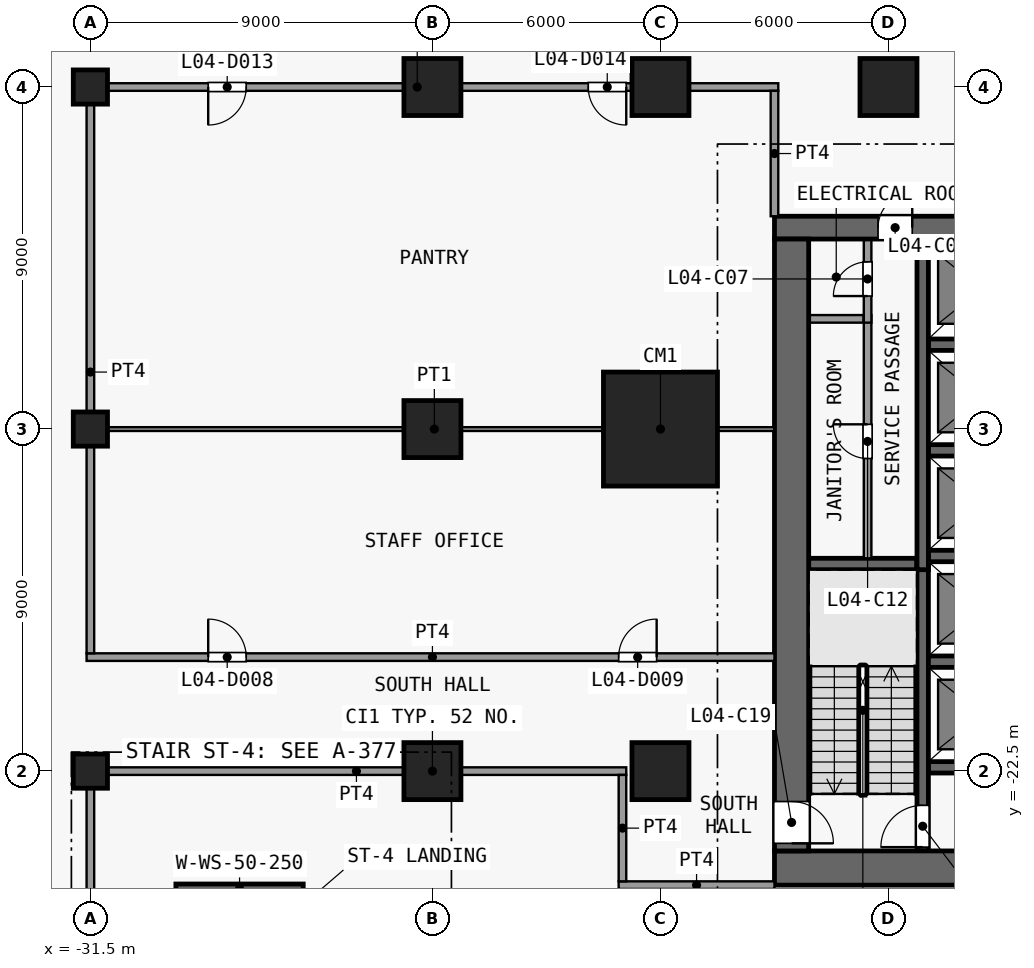
"""IFC4 building model, lengths in metres.
Left out: names, types, materials, properties, quantities, classifications, styles, units other than length and angle.
Written with IfcOpenShell. Run it as: python <this file> out.ifc"""

import sys

from ifc_helpers import new_model, si_unit, direction, frame, frame_2d, origin, origin_2d, place, context, subcontext, project, spatial, rectangle, extrude, element, fill, save


model = new_model("IFC4")
c1 = context("Model", 3, precision=1e-05, world=origin(), true_north=direction((0.0, 1.0)))
c2 = subcontext(c1, "Body", "Model", "MODEL_VIEW")
j1 = project(units=[si_unit("LENGTHUNIT", "METRE"), si_unit("PLANEANGLEUNIT", "RADIAN")], contexts=[c1])
p1 = place(None, origin())
s1 = spatial("IfcSite", under=j1, at=p1, CompositionType="ELEMENT")
p2 = place(p1, origin())
s2 = spatial("IfcBuilding", under=s1, at=p2, CompositionType="ELEMENT")
p3 = place(p2, frame((0.0, 0.0, 23.5)))
s3 = spatial("IfcBuildingStorey", under=s2, at=p3, CompositionType="ELEMENT", Elevation=23.5)
for number, where, z_axis, x_axis in (
    (1, (-31.5, -22.5, 0.0), (0.0, 0.0, 1.0), (1.0, 0.0, 0.0)),
    (2, (-31.5, -13.5, 0.0), (0.0, 0.0, 1.0), (1.0, 0.0, 0.0)),
    (3, (-31.5, -4.5, 0.0), (0.0, 0.0, 1.0), (1.0, 0.0, 0.0)),
):
    element("IfcColumn", number, at=place(p3, frame(where, z_axis=z_axis, x_axis=x_axis)), inside=s3, PredefinedType="COLUMN", context=c2, shape_type="SweptSolid", body=[
        extrude(rectangle(XDim=0.9, YDim=0.9, at=origin_2d()), origin(), (0.0, 0.0, 1.0), 4.5),
    ])
for number, where, z_axis, x_axis in (
    (4, (-22.5, -22.5, 0.0), (0.0, 0.0, 1.0), (1.0, 0.0, 0.0)),
    (5, (-22.5, -13.5, 0.0), (0.0, 0.0, 1.0), (1.0, 0.0, 0.0)),
    (6, (-22.5, -4.5, 0.0), (0.0, 0.0, 1.0), (1.0, 0.0, 0.0)),
    (7, (-16.5, -22.5, 0.0), (0.0, 0.0, 1.0), (1.0, 0.0, 0.0)),
):
    element("IfcColumn", number, at=place(p3, frame(where, z_axis=z_axis, x_axis=x_axis)), inside=s3, PredefinedType="COLUMN", context=c2, shape_type="SweptSolid", body=[
        extrude(rectangle(XDim=1.5, YDim=1.5, at=origin_2d()), origin(), (0.0, 0.0, 1.0), 4.5),
    ])
p4 = place(p3, frame((-16.5, -13.5, 0.0), z_axis=(0.0, 0.0, 1.0), x_axis=(1.0, 0.0, 0.0)))
e8 = element("IfcColumn", 8, at=p4, inside=s3, PredefinedType="COLUMN", context=c2, shape_type="SweptSolid", body=[
    extrude(rectangle(XDim=3.0, YDim=3.0, at=origin_2d()), origin(), (0.0, 0.0, 1.0), 4.5),
])
for number, where, z_axis, x_axis in (
    (9, (-16.5, -4.5, 0.0), (0.0, 0.0, 1.0), (1.0, 0.0, 0.0)),
    (10, (-10.5, -4.5, 0.0), (0.0, 0.0, 1.0), (1.0, 0.0, 0.0)),
):
    element("IfcColumn", number, at=place(p3, frame(where, z_axis=z_axis, x_axis=x_axis)), inside=s3, PredefinedType="COLUMN", context=c2, shape_type="SweptSolid", body=[
        extrude(rectangle(XDim=1.5, YDim=1.5, at=origin_2d()), origin(), (0.0, 0.0, 1.0), 4.5),
    ])
p5 = place(p3, frame((-13.5, -25.05, 0.0), z_axis=(0.0, 0.0, 1.0), x_axis=(1.0, 0.0, 0.0)))
e11 = element("IfcWall", 11, at=p5, inside=s3, PredefinedType="SHEAR", context=c2, shape_type="SweptSolid", body=[
    extrude(rectangle(XDim=27.0, YDim=0.9, at=frame_2d((13.5, 0.0))), origin(), (0.0, 0.0, 1.0), 4.15),
])
p6 = place(p3, frame((-13.5, -8.2, 0.0), z_axis=(0.0, 0.0, 1.0), x_axis=(1.0, 0.0, 0.0)))
e12 = element("IfcWall", 12, at=p6, inside=s3, PredefinedType="SHEAR", context=c2, shape_type="SweptSolid", body=[
    extrude(rectangle(XDim=27.0, YDim=0.6, at=frame_2d((13.5, 0.0))), origin(), (0.0, 0.0, 1.0), 4.15),
])
p7 = place(p6, frame((7.8, 0.0, 0.0)))
e13 = element("IfcOpeningElement", 13, at=p7, cuts=e12, PredefinedType="OPENING", context=c2, shape_type="SweptSolid", body=[
    extrude(rectangle(XDim=1.8, YDim=2.1, at=frame_2d((0.9, 1.05))), frame((0.0, 0.31, 0.0), z_axis=(0.0, -1.0, 0.0), x_axis=(1.0, 0.0, 0.0)), (0.0, 0.0, 1.0), 0.62),
])
p8 = place(p6, frame((17.4, 0.0, 0.0)))
e14 = element("IfcOpeningElement", 14, at=p8, cuts=e12, PredefinedType="OPENING", context=c2, shape_type="SweptSolid", body=[
    extrude(rectangle(XDim=1.8, YDim=2.1, at=frame_2d((0.9, 1.05))), frame((0.0, 0.31, 0.0), z_axis=(0.0, -1.0, 0.0), x_axis=(1.0, 0.0, 0.0)), (0.0, 0.0, 1.0), 0.62),
])
p9 = place(p6, frame((2.725, 0.0, 0.0)))
e15 = element("IfcOpeningElement", 15, at=p9, cuts=e12, PredefinedType="OPENING", context=c2, shape_type="SweptSolid", body=[
    extrude(rectangle(XDim=0.9, YDim=2.1, at=frame_2d((0.45, 1.05))), frame((0.0, 0.31, 0.0), z_axis=(0.0, -1.0, 0.0), x_axis=(1.0, 0.0, 0.0)), (0.0, 0.0, 1.0), 0.62),
])
p10 = place(p6, frame((23.375, 0.0, 0.0)))
e16 = element("IfcOpeningElement", 16, at=p10, cuts=e12, PredefinedType="OPENING", context=c2, shape_type="SweptSolid", body=[
    extrude(rectangle(XDim=0.9, YDim=2.1, at=frame_2d((0.45, 1.05))), frame((0.0, 0.31, 0.0), z_axis=(0.0, -1.0, 0.0), x_axis=(1.0, 0.0, 0.0)), (0.0, 0.0, 1.0), 0.62),
])
p11 = place(p3, frame((-13.05, -8.5, 0.0), z_axis=(0.0, 0.0, 1.0), x_axis=(0.0, -1.0, 0.0)))
e17 = element("IfcWall", 17, at=p11, inside=s3, PredefinedType="SHEAR", context=c2, shape_type="SweptSolid", body=[
    extrude(rectangle(XDim=16.1, YDim=0.9, at=frame_2d((8.05, 0.0))), origin(), (0.0, 0.0, 1.0), 4.15),
])
p12 = place(p11, frame((14.8, 0.0, 0.0)))
e18 = element("IfcOpeningElement", 18, at=p12, cuts=e17, PredefinedType="OPENING", context=c2, shape_type="SweptSolid", body=[
    extrude(rectangle(XDim=1.1, YDim=2.1, at=frame_2d((0.55, 1.05))), frame((0.0, 0.46, 0.0), z_axis=(0.0, -1.0, 0.0), x_axis=(1.0, 0.0, 0.0)), (0.0, 0.0, 1.0), 0.92),
])
for number, where, z_axis, x_axis in (
    (19, (-9.45, -22.4, 0.0), (0.0, 0.0, 1.0), (1.0, 0.0, 0.0)),
    (20, (-9.45, -19.62, 0.0), (0.0, 0.0, 1.0), (1.0, 0.0, 0.0)),
):
    element("IfcWall", number, at=place(p3, frame(where, z_axis=z_axis, x_axis=x_axis)), inside=s3, PredefinedType="SHEAR", context=c2, shape_type="SweptSolid", body=[
        extrude(rectangle(XDim=2.8, YDim=0.3, at=frame_2d((1.4, 0.0))), origin(), (0.0, 0.0, 1.0), 4.15),
    ])
p13 = place(p3, frame((-12.6, -17.05, 0.0), z_axis=(0.0, 0.0, 1.0), x_axis=(1.0, 0.0, 0.0)))
e21 = element("IfcWall", 21, at=p13, inside=s3, PredefinedType="SHEAR", context=c2, shape_type="SweptSolid", body=[
    extrude(rectangle(XDim=2.85, YDim=0.3, at=frame_2d((1.425, 0.0))), origin(), (0.0, 0.0, 1.0), 4.15),
])
for number, where, z_axis, x_axis in (
    (22, (-9.45, -16.84, 0.0), (0.0, 0.0, 1.0), (1.0, 0.0, 0.0)),
    (23, (-9.45, -14.06, 0.0), (0.0, 0.0, 1.0), (1.0, 0.0, 0.0)),
    (24, (-9.45, -11.28, 0.0), (0.0, 0.0, 1.0), (1.0, 0.0, 0.0)),
):
    element("IfcWall", number, at=place(p3, frame(where, z_axis=z_axis, x_axis=x_axis)), inside=s3, PredefinedType="SHEAR", context=c2, shape_type="SweptSolid", body=[
        extrude(rectangle(XDim=2.8, YDim=0.3, at=frame_2d((1.4, 0.0))), origin(), (0.0, 0.0, 1.0), 4.15),
    ])
p14 = place(p3, frame((-12.6, -10.6, 0.0), z_axis=(0.0, 0.0, 1.0), x_axis=(1.0, 0.0, 0.0)))
e25 = element("IfcWall", 25, at=p14, inside=s3, PredefinedType="PARTITIONING", context=c2, shape_type="SweptSolid", body=[
    extrude(rectangle(XDim=1.45, YDim=0.2, at=frame_2d((0.725, 0.0))), origin(), (0.0, 0.0, 1.0), 4.15),
])
p15 = place(p3, frame((-11.05, -16.9, 0.0), z_axis=(0.0, 0.0, 1.0), x_axis=(0.0, 1.0, 0.0)))
e26 = element("IfcWall", 26, at=p15, inside=s3, PredefinedType="PARTITIONING", context=c2, shape_type="SweptSolid", body=[
    extrude(rectangle(XDim=6.4, YDim=0.2, at=frame_2d((3.2, 0.0))), origin(), (0.0, 0.0, 1.0), 4.15),
])
p16 = place(p15, frame((2.625, 0.0, 0.0)))
e27 = element("IfcOpeningElement", 27, at=p16, cuts=e26, PredefinedType="OPENING", context=c2, shape_type="SweptSolid", body=[
    extrude(rectangle(XDim=0.9, YDim=2.1, at=frame_2d((0.45, 1.05))), frame((0.0, 0.11, 0.0), z_axis=(0.0, -1.0, 0.0), x_axis=(1.0, 0.0, 0.0)), (0.0, 0.0, 1.0), 0.22),
])
p17 = place(p3, frame((-11.05, -10.7, 0.0), z_axis=(0.0, 0.0, 1.0), x_axis=(0.0, 1.0, 0.0)))
e28 = element("IfcWall", 28, at=p17, inside=s3, PredefinedType="PARTITIONING", context=c2, shape_type="SweptSolid", body=[
    extrude(rectangle(XDim=2.2, YDim=0.2, at=frame_2d((1.1, 0.0))), origin(), (0.0, 0.0, 1.0), 4.15),
])
p18 = place(p17, frame((0.7, 0.0, 0.0)))
e29 = element("IfcOpeningElement", 29, at=p18, cuts=e28, PredefinedType="OPENING", context=c2, shape_type="SweptSolid", body=[
    extrude(rectangle(XDim=0.9, YDim=2.1, at=frame_2d((0.45, 1.05))), frame((0.0, 0.11, 0.0), z_axis=(0.0, -1.0, 0.0), x_axis=(1.0, 0.0, 0.0)), (0.0, 0.0, 1.0), 0.22),
])
p19 = place(p3, frame((-9.6, -24.6, 0.0), z_axis=(0.0, 0.0, 1.0), x_axis=(0.0, 1.0, 0.0)))
e30 = element("IfcWall", 30, at=p19, inside=s3, PredefinedType="SHEAR", context=c2, shape_type="SweptSolid", body=[
    extrude(rectangle(XDim=7.7, YDim=0.3, at=frame_2d((3.85, 0.0))), origin(), (0.0, 0.0, 1.0), 4.15),
])
p20 = place(p19, frame((0.1, 0.0, 0.0)))
e31 = element("IfcOpeningElement", 31, at=p20, cuts=e30, PredefinedType="OPENING", context=c2, shape_type="SweptSolid", body=[
    extrude(rectangle(XDim=1.1, YDim=2.1, at=frame_2d((0.55, 1.05))), frame((0.0, 0.16, 0.0), z_axis=(0.0, -1.0, 0.0), x_axis=(1.0, 0.0, 0.0)), (0.0, 0.0, 1.0), 0.32),
])
p21 = place(p3, frame((-9.6, -17.2, 0.0), z_axis=(0.0, 0.0, 1.0), x_axis=(0.0, 1.0, 0.0)))
e32 = element("IfcWall", 32, at=p21, inside=s3, PredefinedType="SHEAR", context=c2, shape_type="SweptSolid", body=[
    extrude(rectangle(XDim=8.7, YDim=0.3, at=frame_2d((4.35, 0.0))), origin(), (0.0, 0.0, 1.0), 4.15),
])
p22 = place(p3, frame((-29.25, -25.595, 0.0), z_axis=(0.0, 0.0, 1.0), x_axis=(1.0, 0.0, 0.0)))
e33 = element("IfcWall", 33, at=p22, inside=s3, PredefinedType="SHEAR", context=c2, shape_type="SweptSolid", body=[
    extrude(rectangle(XDim=3.35, YDim=0.25, at=frame_2d((1.675, 0.0))), origin(), (0.0, 0.0, 1.0), 4.15),
])
p23 = place(p3, frame((-17.6, -25.5, 0.0), z_axis=(0.0, 0.0, 1.0), x_axis=(1.0, 0.0, 0.0)))
e34 = element("IfcWall", 34, at=p23, inside=s3, PredefinedType="PARTITIONING", context=c2, shape_type="SweptSolid", body=[
    extrude(rectangle(XDim=4.1, YDim=0.2, at=frame_2d((2.05, 0.0))), origin(), (0.0, 0.0, 1.0), 4.15),
])
p24 = place(p3, frame((-31.6, -22.5, 0.0), z_axis=(0.0, 0.0, 1.0), x_axis=(1.0, 0.0, 0.0)))
e35 = element("IfcWall", 35, at=p24, inside=s3, PredefinedType="PARTITIONING", context=c2, shape_type="SweptSolid", body=[
    extrude(rectangle(XDim=14.2, YDim=0.2, at=frame_2d((7.1, 0.0))), origin(), (0.0, 0.0, 1.0), 4.15),
])
p25 = place(p3, frame((-31.6, -19.5, 0.0), z_axis=(0.0, 0.0, 1.0), x_axis=(1.0, 0.0, 0.0)))
e36 = element("IfcWall", 36, at=p25, inside=s3, PredefinedType="PARTITIONING", context=c2, shape_type="SweptSolid", body=[
    extrude(rectangle(XDim=18.1, YDim=0.2, at=frame_2d((9.05, 0.0))), origin(), (0.0, 0.0, 1.0), 4.15),
])
p26 = place(p25, frame((3.2, 0.0, 0.0)))
e37 = element("IfcOpeningElement", 37, at=p26, cuts=e36, PredefinedType="OPENING", context=c2, shape_type="SweptSolid", body=[
    extrude(rectangle(XDim=1.0, YDim=2.1, at=frame_2d((0.5, 1.05))), frame((0.0, 0.11, 0.0), z_axis=(0.0, -1.0, 0.0), x_axis=(1.0, 0.0, 0.0)), (0.0, 0.0, 1.0), 0.22),
])
p27 = place(p25, frame((14.0, 0.0, 0.0)))
e38 = element("IfcOpeningElement", 38, at=p27, cuts=e36, PredefinedType="OPENING", context=c2, shape_type="SweptSolid", body=[
    extrude(rectangle(XDim=1.0, YDim=2.1, at=frame_2d((0.5, 1.05))), frame((0.0, 0.11, 0.0), z_axis=(0.0, -1.0, 0.0), x_axis=(1.0, 0.0, 0.0)), (0.0, 0.0, 1.0), 0.22),
])
p28 = place(p3, frame((-31.4, -13.5, 0.0), z_axis=(0.0, 0.0, 1.0), x_axis=(1.0, 0.0, 0.0)))
e39 = element("IfcWall", 39, at=p28, inside=s3, PredefinedType="PARTITIONING", context=c2, shape_type="SweptSolid", body=[
    extrude(rectangle(XDim=17.9, YDim=0.1, at=frame_2d((8.95, 0.0))), origin(), (0.0, 0.0, 1.0), 4.15),
])
p29 = place(p3, frame((-31.6, -4.5, 0.0), z_axis=(0.0, 0.0, 1.0), x_axis=(1.0, 0.0, 0.0)))
e40 = element("IfcWall", 40, at=p29, inside=s3, PredefinedType="PARTITIONING", context=c2, shape_type="SweptSolid", body=[
    extrude(rectangle(XDim=18.2, YDim=0.2, at=frame_2d((9.1, 0.0))), origin(), (0.0, 0.0, 1.0), 4.15),
])
p30 = place(p29, frame((3.2, 0.0, 0.0)))
e41 = element("IfcOpeningElement", 41, at=p30, cuts=e40, PredefinedType="OPENING", context=c2, shape_type="SweptSolid", body=[
    extrude(rectangle(XDim=1.0, YDim=2.1, at=frame_2d((0.5, 1.05))), frame((0.0, 0.11, 0.0), z_axis=(0.0, -1.0, 0.0), x_axis=(1.0, 0.0, 0.0)), (0.0, 0.0, 1.0), 0.22),
])
p31 = place(p29, frame((13.2, 0.0, 0.0)))
e42 = element("IfcOpeningElement", 42, at=p31, cuts=e40, PredefinedType="OPENING", context=c2, shape_type="SweptSolid", body=[
    extrude(rectangle(XDim=1.0, YDim=2.1, at=frame_2d((0.5, 1.05))), frame((0.0, 0.11, 0.0), z_axis=(0.0, -1.0, 0.0), x_axis=(1.0, 0.0, 0.0)), (0.0, 0.0, 1.0), 0.22),
])
p32 = place(p3, frame((-31.5, -31.4, 0.0), z_axis=(0.0, 0.0, 1.0), x_axis=(0.0, 1.0, 0.0)))
e43 = element("IfcWall", 43, at=p32, inside=s3, PredefinedType="PARTITIONING", context=c2, shape_type="SweptSolid", body=[
    extrude(rectangle(XDim=8.8, YDim=0.2, at=frame_2d((4.4, 0.0))), origin(), (0.0, 0.0, 1.0), 4.15),
])
p33 = place(p3, frame((-31.5, -19.4, 0.0), z_axis=(0.0, 0.0, 1.0), x_axis=(0.0, 1.0, 0.0)))
e44 = element("IfcWall", 44, at=p33, inside=s3, PredefinedType="PARTITIONING", context=c2, shape_type="SweptSolid", body=[
    extrude(rectangle(XDim=14.8, YDim=0.2, at=frame_2d((7.4, 0.0))), origin(), (0.0, 0.0, 1.0), 4.15),
])
p34 = place(p3, frame((-17.5, -25.4, 0.0), z_axis=(0.0, 0.0, 1.0), x_axis=(0.0, 1.0, 0.0)))
e45 = element("IfcWall", 45, at=p34, inside=s3, PredefinedType="PARTITIONING", context=c2, shape_type="SweptSolid", body=[
    extrude(rectangle(XDim=2.8, YDim=0.2, at=frame_2d((1.4, 0.0))), origin(), (0.0, 0.0, 1.0), 4.15),
])
p35 = place(p3, frame((-13.5, -7.9, 0.0), z_axis=(0.0, 0.0, 1.0), x_axis=(0.0, 1.0, 0.0)))
e46 = element("IfcWall", 46, at=p35, inside=s3, PredefinedType="PARTITIONING", context=c2, shape_type="SweptSolid", body=[
    extrude(rectangle(XDim=3.3, YDim=0.2, at=frame_2d((1.65, 0.0))), origin(), (0.0, 0.0, 1.0), 4.15),
])
p36 = place(p18, origin())
e47 = element("IfcDoor", 47, at=p36, inside=s3, OperationType="SINGLE_SWING_LEFT", PredefinedType="DOOR", context=c2, shape_type="SweptSolid", body=[
    extrude(rectangle(XDim=0.9, YDim=2.1, at=frame_2d((0.45, 1.05))), frame((0.0, 0.025, 0.0), z_axis=(0.0, -1.0, 0.0), x_axis=(1.0, 0.0, 0.0)), (0.0, 0.0, 1.0), 0.05),
])
fill(e29, e47)
p37 = place(p9, origin())
e48 = element("IfcDoor", 48, at=p37, inside=s3, OperationType="SINGLE_SWING_RIGHT", PredefinedType="DOOR", context=c2, shape_type="SweptSolid", body=[
    extrude(rectangle(XDim=0.9, YDim=2.1, at=frame_2d((0.45, 1.05))), frame((0.0, 0.025, 0.0), z_axis=(0.0, -1.0, 0.0), x_axis=(1.0, 0.0, 0.0)), (0.0, 0.0, 1.0), 0.05),
])
fill(e15, e48)
p38 = place(p16, origin())
e49 = element("IfcDoor", 49, at=p38, inside=s3, OperationType="SINGLE_SWING_RIGHT", PredefinedType="DOOR", context=c2, shape_type="SweptSolid", body=[
    extrude(rectangle(XDim=0.9, YDim=2.1, at=frame_2d((0.45, 1.05))), frame((0.0, 0.025, 0.0), z_axis=(0.0, -1.0, 0.0), x_axis=(1.0, 0.0, 0.0)), (0.0, 0.0, 1.0), 0.05),
])
fill(e27, e49)
p39 = place(p20, origin())
e50 = element("IfcDoor", 50, at=p39, inside=s3, OperationType="SINGLE_SWING_LEFT", PredefinedType="DOOR", context=c2, shape_type="SweptSolid", body=[
    extrude(rectangle(XDim=1.1, YDim=2.1, at=frame_2d((0.55, 1.05))), frame((0.0, 0.025, 0.0), z_axis=(0.0, -1.0, 0.0), x_axis=(1.0, 0.0, 0.0)), (0.0, 0.0, 1.0), 0.05),
])
fill(e31, e50)
p40 = place(p12, origin())
e51 = element("IfcDoor", 51, at=p40, inside=s3, OperationType="SINGLE_SWING_RIGHT", PredefinedType="DOOR", context=c2, shape_type="SweptSolid", body=[
    extrude(rectangle(XDim=1.1, YDim=2.1, at=frame_2d((0.55, 1.05))), frame((0.0, 0.025, 0.0), z_axis=(0.0, -1.0, 0.0), x_axis=(1.0, 0.0, 0.0)), (0.0, 0.0, 1.0), 0.05),
])
fill(e18, e51)
p41 = place(p26, origin())
e52 = element("IfcDoor", 52, at=p41, inside=s3, OperationType="SINGLE_SWING_RIGHT", PredefinedType="DOOR", context=c2, shape_type="SweptSolid", body=[
    extrude(rectangle(XDim=1.0, YDim=2.1, at=frame_2d((0.5, 1.05))), frame((0.0, 0.025, 0.0), z_axis=(0.0, -1.0, 0.0), x_axis=(1.0, 0.0, 0.0)), (0.0, 0.0, 1.0), 0.05),
])
fill(e37, e52)
p42 = place(p27, origin())
e53 = element("IfcDoor", 53, at=p42, inside=s3, OperationType="SINGLE_SWING_LEFT", PredefinedType="DOOR", context=c2, shape_type="SweptSolid", body=[
    extrude(rectangle(XDim=1.0, YDim=2.1, at=frame_2d((0.5, 1.05))), frame((0.0, 0.025, 0.0), z_axis=(0.0, -1.0, 0.0), x_axis=(1.0, 0.0, 0.0)), (0.0, 0.0, 1.0), 0.05),
])
fill(e38, e53)
p43 = place(p30, origin())
e54 = element("IfcDoor", 54, at=p43, inside=s3, OperationType="SINGLE_SWING_LEFT", PredefinedType="DOOR", context=c2, shape_type="SweptSolid", body=[
    extrude(rectangle(XDim=1.0, YDim=2.1, at=frame_2d((0.5, 1.05))), frame((0.0, 0.025, 0.0), z_axis=(0.0, -1.0, 0.0), x_axis=(1.0, 0.0, 0.0)), (0.0, 0.0, 1.0), 0.05),
])
fill(e41, e54)
p44 = place(p31, origin())
e55 = element("IfcDoor", 55, at=p44, inside=s3, OperationType="SINGLE_SWING_RIGHT", PredefinedType="DOOR", context=c2, shape_type="SweptSolid", body=[
    extrude(rectangle(XDim=1.0, YDim=2.1, at=frame_2d((0.5, 1.05))), frame((0.0, 0.025, 0.0), z_axis=(0.0, -1.0, 0.0), x_axis=(1.0, 0.0, 0.0)), (0.0, 0.0, 1.0), 0.05),
])
fill(e42, e55)
save(model, sys.argv[1])
